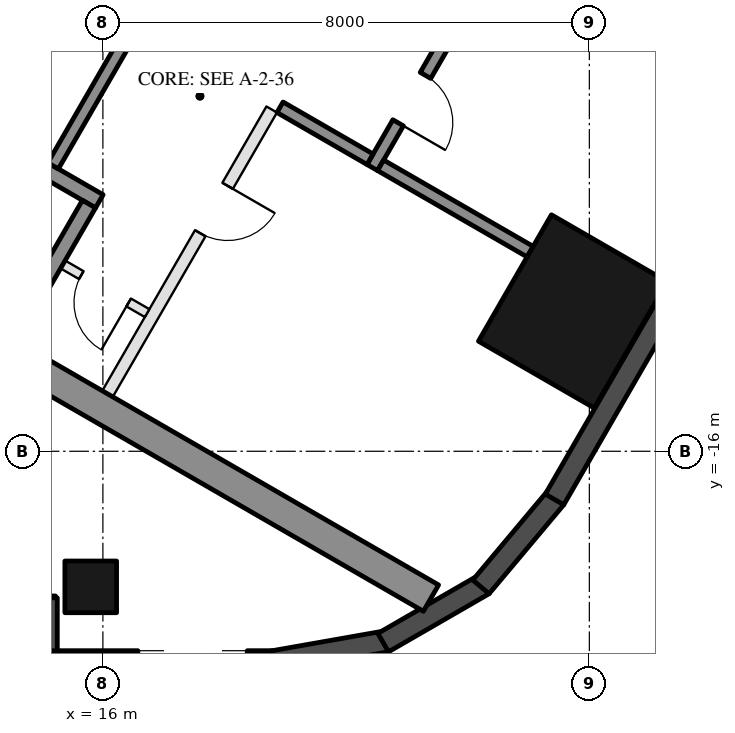
"""IFC4 building model, lengths in metres.
Left out: names, types, materials, properties, quantities, classifications, styles, units other than length and angle.
Written with IfcOpenShell. Run it as: python <this file> out.ifc"""

import sys

from ifc_helpers import new_model, si_unit, direction, frame, frame_2d, origin, origin_2d, place, context, subcontext, project, spatial, rectangle, hollow_rectangle, extrude, element, fill, save


model = new_model("IFC4")
c1 = context("Model", 3, precision=1e-05, world=origin(), true_north=direction((0.0, 1.0)))
c2 = subcontext(c1, "Body", "Model", "MODEL_VIEW")
j1 = project(units=[si_unit("LENGTHUNIT", "METRE"), si_unit("PLANEANGLEUNIT", "RADIAN")], contexts=[c1])
p1 = place(None, origin())
s1 = spatial("IfcSite", under=j1, at=p1, CompositionType="ELEMENT")
p2 = place(p1, origin())
s2 = spatial("IfcBuilding", under=s1, at=p2, CompositionType="ELEMENT")
p3 = place(p2, frame((0.0, 0.0, 157.7)))
s3 = spatial("IfcBuildingStorey", under=s2, at=p3, CompositionType="ELEMENT", Elevation=157.7)
p4 = place(p3, frame((15.8, -18.23, 0.0), z_axis=(0.0, 0.0, 1.0), x_axis=(-1.0, 0.0, 0.0)))
e1 = element("IfcColumn", 1, at=p4, inside=s3, PredefinedType="COLUMN", context=c2, shape_type="SweptSolid", body=[
    extrude(hollow_rectangle(XDim=0.85, YDim=0.85, WallThickness=0.04, at=origin_2d()), origin(), (0.0, 0.0, 1.0), 3.7),
])
p5 = place(p3, frame((23.729, -13.7, 0.0), z_axis=(0.0, 0.0, 1.0), x_axis=(0.5, 0.866025403784, 0.0)))
e2 = element("IfcColumn", 2, at=p5, inside=s3, PredefinedType="COLUMN", context=c2, shape_type="SweptSolid", body=[
    extrude(hollow_rectangle(XDim=2.4, YDim=2.2, WallThickness=0.06, at=origin_2d()), origin(), (0.0, 0.0, 1.0), 3.7),
])
p6 = place(p3, frame((8.48, -18.555, 0.0), z_axis=(0.0, 0.0, 1.0), x_axis=(1.0, 0.0, 0.0)))
e3 = element("IfcWall", 3, at=p6, inside=s3, PredefinedType="SOLIDWALL", context=c2, shape_type="SweptSolid", body=[
    extrude(rectangle(XDim=6.74, YDim=0.35, at=frame_2d((3.37, 0.0))), origin(), (0.0, 0.0, 1.0), 3.55),
])
p7 = place(p6, frame((3.57, 0.0, 0.0)))
e4 = element("IfcOpeningElement", 4, at=p7, cuts=e3, PredefinedType="OPENING", context=c2, shape_type="SweptSolid", body=[
    extrude(rectangle(XDim=2.4, YDim=2.4, at=frame_2d((1.2, 1.2))), frame((0.0, 0.185, 0.0), z_axis=(0.0, -1.0, 0.0), x_axis=(1.0, 0.0, 0.0)), (0.0, 0.0, 1.0), 0.37),
])
p8 = place(p6, frame((0.32, 0.0, 0.3)))
e5 = element("IfcOpeningElement", 5, at=p8, cuts=e3, PredefinedType="OPENING", context=c2, shape_type="SweptSolid", body=[
    extrude(rectangle(XDim=2.9, YDim=2.65, at=frame_2d((1.45, 1.325))), frame((0.0, 0.185, 0.0), z_axis=(0.0, -1.0, 0.0), x_axis=(1.0, 0.0, 0.0)), (0.0, 0.0, 1.0), 0.37),
])
p9 = place(p3, frame((15.075, -18.41, 0.0), z_axis=(0.0, 0.0, 1.0), x_axis=(0.0, -1.0, 0.0)))
e6 = element("IfcWall", 6, at=p9, inside=s3, PredefinedType="SOLIDWALL", context=c2, shape_type="SweptSolid", body=[
    extrude(rectangle(XDim=1.22, YDim=0.35, at=frame_2d((0.61, 0.0))), origin(), (0.0, 0.0, 1.0), 3.55),
])
p10 = place(p3, frame((14.9, -19.455, 0.0), z_axis=(0.0, 0.0, 1.0), x_axis=(1.0, 0.0, 0.0)))
e7 = element("IfcWall", 7, at=p10, inside=s3, PredefinedType="SOLIDWALL", context=c2, shape_type="SweptSolid", body=[
    extrude(rectangle(XDim=3.916, YDim=0.35, at=frame_2d((1.958, 0.0))), origin(), (0.0, 0.0, 1.0), 3.55),
])
p11 = place(p10, frame((1.675, 0.0, 0.3)))
e8 = element("IfcOpeningElement", 8, at=p11, cuts=e7, PredefinedType="OPENING", context=c2, shape_type="SweptSolid", body=[
    extrude(rectangle(XDim=1.8, YDim=2.65, at=frame_2d((0.9, 1.325))), frame((0.0, 0.185, 0.0), z_axis=(0.0, -1.0, 0.0), x_axis=(1.0, 0.0, 0.0)), (0.0, 0.0, 1.0), 0.37),
])
p12 = place(p3, frame((18.785, -19.458, 0.0), z_axis=(0.0, 0.0, 1.0), x_axis=(0.984798995425, 0.173697837091, 0.0)))
e9 = element("IfcWall", 9, at=p12, inside=s3, PredefinedType="SOLIDWALL", context=c2, shape_type="SweptSolid", body=[
    extrude(rectangle(XDim=1.91, YDim=0.35, at=frame_2d((0.955, 0.0))), origin(), (0.0, 0.0, 1.0), 3.55),
])
for number, where, z_axis, x_axis in (
    (10, (20.61, -19.147, 0.0), (0.0, 0.0, 1.0), (0.866, 0.5, 0.0)),
    (11, (22.217, -18.231, 0.0), (0.0, 0.0, 1.0), (0.643, 0.766, 0.0)),
):
    element("IfcWall", number, at=place(p3, frame(where, z_axis=z_axis, x_axis=x_axis)), inside=s3, PredefinedType="SOLIDWALL", context=c2, shape_type="SweptSolid", body=[
        extrude(rectangle(XDim=1.91, YDim=0.35, at=frame_2d((0.955, 0.0))), origin(), (0.0, 0.0, 1.0), 3.55),
    ])
p13 = place(p3, frame((23.427, -16.792, 0.0), z_axis=(0.0, 0.0, 1.0), x_axis=(0.500018773155, 0.866014564827, 0.0)))
e12 = element("IfcWall", 12, at=p13, inside=s3, PredefinedType="SOLIDWALL", context=c2, shape_type="SweptSolid", body=[
    extrude(rectangle(XDim=5.658, YDim=0.35, at=frame_2d((2.829, 0.0))), origin(), (0.0, 0.0, 1.0), 3.55),
])
for number, where, z_axis, x_axis in (
    (13, (8.547, -10.997, 0.0), (0.0, 0.0, 1.0), (0.866, -0.5, 0.0)),
    (14, (13.797, -1.903, 0.0), (0.0, 0.0, 1.0), (0.866, -0.5, 0.0)),
):
    element("IfcWall", number, at=place(p3, frame(where, z_axis=z_axis, x_axis=x_axis)), inside=s3, PredefinedType="SHEAR", context=c2, shape_type="SweptSolid", body=[
        extrude(rectangle(XDim=14.837, YDim=0.5, at=frame_2d((7.418, 0.0))), origin(), (0.0, 0.0, 1.0), 3.5),
    ])
p14 = place(p3, frame((10.356, -8.664, 0.0), z_axis=(0.0, 0.0, 1.0), x_axis=(0.866028629588, -0.499994412703, 0.0)))
e15 = element("IfcWall", 15, at=p14, inside=s3, PredefinedType="SHEAR", context=c2, shape_type="SweptSolid", body=[
    extrude(rectangle(XDim=6.45, YDim=0.25, at=frame_2d((3.225, 0.0))), origin(), (0.0, 0.0, 1.0), 3.5),
])
p15 = place(p14, frame((0.3, 0.0, 0.0)))
e16 = element("IfcOpeningElement", 16, at=p15, cuts=e15, PredefinedType="OPENING", context=c2, shape_type="SweptSolid", body=[
    extrude(rectangle(XDim=1.0, YDim=2.1, at=frame_2d((0.5, 1.05))), frame((0.0, 0.135, 0.0), z_axis=(0.0, -1.0, 0.0), x_axis=(1.0, 0.0, 0.0)), (0.0, 0.0, 1.0), 0.27),
])
p16 = place(p3, frame((14.496, -14.143, 0.0), z_axis=(0.0, 0.0, 1.0), x_axis=(0.500062241894, 0.865989465428, 0.0)))
e17 = element("IfcWall", 17, at=p16, inside=s3, PredefinedType="SHEAR", context=c2, shape_type="SweptSolid", body=[
    extrude(rectangle(XDim=2.55, YDim=0.25, at=frame_2d((1.275, 0.0))), origin(), (0.0, 0.0, 1.0), 3.5),
])
p17 = place(p3, frame((15.181, -11.305, 0.0), z_axis=(0.0, 0.0, 1.0), x_axis=(0.49994636267, 0.866056369097, 0.0)))
e18 = element("IfcWall", 18, at=p17, inside=s3, PredefinedType="SHEAR", context=c2, shape_type="SweptSolid", body=[
    extrude(rectangle(XDim=2.8, YDim=0.2, at=frame_2d((1.4, 0.0))), origin(), (0.0, 0.0, 1.0), 3.5),
])
p18 = place(p3, frame((20.43, -11.333, 0.0), z_axis=(0.0, 0.0, 1.0), x_axis=(0.500001309137, 0.866024647952, 0.0)))
e19 = element("IfcWall", 19, at=p18, inside=s3, PredefinedType="SHEAR", context=c2, shape_type="SweptSolid", body=[
    extrude(rectangle(XDim=2.4, YDim=0.2, at=frame_2d((1.2, 0.0))), origin(), (0.0, 0.0, 1.0), 3.5),
])
p19 = place(p18, frame((0.85, 0.0, 0.0)))
e20 = element("IfcOpeningElement", 20, at=p19, cuts=e19, PredefinedType="OPENING", context=c2, shape_type="SweptSolid", body=[
    extrude(rectangle(XDim=0.9, YDim=2.1, at=frame_2d((0.45, 1.05))), frame((0.0, 0.11, 0.0), z_axis=(0.0, -1.0, 0.0), x_axis=(1.0, 0.0, 0.0)), (0.0, 0.0, 1.0), 0.22),
])
p20 = place(p3, frame((18.913, -10.342, 0.0), z_axis=(0.0, 0.0, 1.0), x_axis=(0.866038183914, -0.499977863513, 0.0)))
e21 = element("IfcWall", 21, at=p20, inside=s3, PredefinedType="SHEAR", context=c2, shape_type="SweptSolid", body=[
    extrude(rectangle(XDim=1.71, YDim=0.2, at=frame_2d((0.855, 0.0))), origin(), (0.0, 0.0, 1.0), 3.5),
])
p21 = place(p3, frame((20.567, -11.297, 0.0), z_axis=(0.0, 0.0, 1.0), x_axis=(0.866055327414, -0.49994816717, 0.0)))
e22 = element("IfcWall", 22, at=p21, inside=s3, PredefinedType="SHEAR", context=c2, shape_type="SweptSolid", body=[
    extrude(rectangle(XDim=2.84, YDim=0.2, at=frame_2d((1.42, 0.0))), origin(), (0.0, 0.0, 1.0), 3.5),
])
p22 = place(p3, frame((16.076, -15.055, 0.0), z_axis=(0.0, 0.0, 1.0), x_axis=(0.499995103361, 0.866028230842, 0.0)))
e23 = element("IfcWall", 23, at=p22, inside=s3, PredefinedType="PARTITIONING", context=c2, shape_type="SweptSolid", body=[
    extrude(rectangle(XDim=5.4, YDim=0.2, at=frame_2d((2.7, 0.0))), origin(), (0.0, 0.0, 1.0), 3.5),
])
p23 = place(p22, frame((3.05, 0.0, 0.0)))
e24 = element("IfcOpeningElement", 24, at=p23, cuts=e23, PredefinedType="OPENING", context=c2, shape_type="SweptSolid", body=[
    extrude(rectangle(XDim=0.9, YDim=2.1, at=frame_2d((0.45, 1.05))), frame((0.0, 0.11, 0.0), z_axis=(0.0, -1.0, 0.0), x_axis=(1.0, 0.0, 0.0)), (0.0, 0.0, 1.0), 0.22),
])
p24 = place(p3, frame((15.342, -12.928, 0.0), z_axis=(0.0, 0.0, 1.0), x_axis=(0.865989903783, -0.500061482766, 0.0)))
e25 = element("IfcWall", 25, at=p24, inside=s3, PredefinedType="PARTITIONING", context=c2, shape_type="SweptSolid", body=[
    extrude(rectangle(XDim=1.6, YDim=0.15, at=frame_2d((0.8, 0.0))), origin(), (0.0, 0.0, 1.0), 3.5),
])
p25 = place(p24, frame((0.35, 0.0, 0.0)))
e26 = element("IfcOpeningElement", 26, at=p25, cuts=e25, PredefinedType="OPENING", context=c2, shape_type="SweptSolid", body=[
    extrude(rectangle(XDim=0.9, YDim=2.1, at=frame_2d((0.45, 1.05))), frame((0.0, 0.085, 0.0), z_axis=(0.0, -1.0, 0.0), x_axis=(1.0, 0.0, 0.0)), (0.0, 0.0, 1.0), 0.17),
])
p26 = place(p25, frame((0.9, 0.0, 0.0), z_axis=(0.0, 0.0, 1.0), x_axis=(-1.0, 0.0, 0.0)))
e27 = element("IfcDoor", 27, at=p26, inside=s3, OperationType="SINGLE_SWING_LEFT", PredefinedType="DOOR", context=c2, shape_type="SweptSolid", body=[
    extrude(rectangle(XDim=0.9, YDim=2.1, at=frame_2d((0.45, 1.05))), frame((0.0, 0.025, 0.0), z_axis=(0.0, -1.0, 0.0), x_axis=(1.0, 0.0, 0.0)), (0.0, 0.0, 1.0), 0.05),
])
fill(e26, e27)
p27 = place(p19, frame((0.9, 0.0, 0.0), z_axis=(0.0, 0.0, 1.0), x_axis=(-1.0, 0.0, 0.0)))
e28 = element("IfcDoor", 28, at=p27, inside=s3, OperationType="SINGLE_SWING_RIGHT", PredefinedType="DOOR", context=c2, shape_type="SweptSolid", body=[
    extrude(rectangle(XDim=0.9, YDim=2.1, at=frame_2d((0.45, 1.05))), frame((0.0, 0.025, 0.0), z_axis=(0.0, -1.0, 0.0), x_axis=(1.0, 0.0, 0.0)), (0.0, 0.0, 1.0), 0.05),
])
fill(e20, e28)
p28 = place(p23, frame((0.9, 0.0, 0.0), z_axis=(0.0, 0.0, 1.0), x_axis=(-1.0, 0.0, 0.0)))
e29 = element("IfcDoor", 29, at=p28, inside=s3, OperationType="SINGLE_SWING_LEFT", PredefinedType="DOOR", context=c2, shape_type="SweptSolid", body=[
    extrude(rectangle(XDim=0.9, YDim=2.1, at=frame_2d((0.45, 1.05))), frame((0.0, 0.025, 0.0), z_axis=(0.0, -1.0, 0.0), x_axis=(1.0, 0.0, 0.0)), (0.0, 0.0, 1.0), 0.05),
])
fill(e24, e29)
save(model, sys.argv[1])
